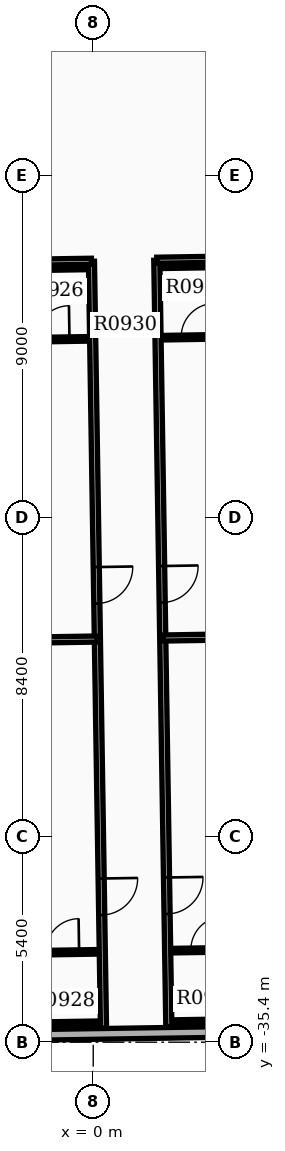
"""IFC4 building model, lengths in metres.
Left out: names, types, materials, properties, quantities, classifications, styles, units other than length and angle.
Written with IfcOpenShell. Run it as: python <this file> out.ifc"""

import sys

from ifc_helpers import new_model, si_unit, direction, frame, frame_2d, origin, place, context, subcontext, project, spatial, rectangle, extrude, element, fill, save


model = new_model("IFC4")
c1 = context("Model", 3, precision=1e-05, world=origin(), true_north=direction((0.0, 1.0)))
c2 = subcontext(c1, "Body", "Model", "MODEL_VIEW")
j1 = project(units=[si_unit("LENGTHUNIT", "METRE"), si_unit("PLANEANGLEUNIT", "RADIAN")], contexts=[c1])
p1 = place(None, origin())
s1 = spatial("IfcSite", under=j1, at=p1, CompositionType="ELEMENT")
p2 = place(p1, origin())
s2 = spatial("IfcBuilding", under=s1, at=p2, CompositionType="ELEMENT")
p3 = place(p2, frame((0.0, 0.0, 60.0)))
s3 = spatial("IfcBuildingStorey", under=s2, at=p3, CompositionType="ELEMENT", Elevation=60.0)
p4 = place(p3, frame((-6.307, -35.283, 0.0), z_axis=(0.0, 0.0, 1.0), x_axis=(0.999876549481, 0.015712599986, 0.0)))
e1 = element("IfcWall", 1, at=p4, inside=s3, PredefinedType="STANDARD", context=c2, shape_type="SweptSolid", body=[
    extrude(rectangle(XDim=13.72, YDim=0.28, at=frame_2d((6.86, 0.0))), origin(), (0.0, 0.0, 1.0), 2.91),
])
p5 = place(p4, frame((0.85, 0.0, 0.85)))
e2 = element("IfcOpeningElement", 2, at=p5, cuts=e1, PredefinedType="OPENING", context=c2, shape_type="SweptSolid", body=[
    extrude(rectangle(XDim=1.0, YDim=1.5, at=frame_2d((0.5, 0.75))), frame((0.0, 0.15, 0.0), z_axis=(0.0, -1.0, 0.0), x_axis=(1.0, 0.0, 0.0)), (0.0, 0.0, 1.0), 0.3),
])
p6 = place(p3, frame((1.673, -14.825, 0.0), z_axis=(0.0, 0.0, 1.0), x_axis=(0.015701893165, -0.999876717676, 0.0)))
e3 = element("IfcWall", 3, at=p6, inside=s3, PredefinedType="PARTITIONING", context=c2, shape_type="SweptSolid", body=[
    extrude(rectangle(XDim=20.182, YDim=0.16, at=frame_2d((10.091, 0.0))), origin(), (0.0, 0.0, 1.0), 2.9),
])
p7 = place(p6, frame((8.047, 0.0, 0.0)))
e4 = element("IfcOpeningElement", 4, at=p7, cuts=e3, PredefinedType="OPENING", context=c2, shape_type="SweptSolid", body=[
    extrude(rectangle(XDim=0.96, YDim=2.15, at=frame_2d((0.48, 1.075))), frame((0.0, 0.09, 0.0), z_axis=(0.0, -1.0, 0.0), x_axis=(1.0, 0.0, 0.0)), (0.0, 0.0, 1.0), 0.18),
])
p8 = place(p6, frame((16.243, 0.0, 0.0)))
e5 = element("IfcOpeningElement", 5, at=p8, cuts=e3, PredefinedType="OPENING", context=c2, shape_type="SweptSolid", body=[
    extrude(rectangle(XDim=0.96, YDim=2.15, at=frame_2d((0.48, 1.075))), frame((0.0, 0.09, 0.0), z_axis=(0.0, -1.0, 0.0), x_axis=(1.0, 0.0, 0.0)), (0.0, 0.0, 1.0), 0.18),
])
p9 = place(p3, frame((1.673, -14.825, 0.0), z_axis=(0.0, 0.0, 1.0), x_axis=(0.999877138082, 0.015675099418, 0.0)))
e6 = element("IfcWall", 6, at=p9, inside=s3, PredefinedType="PARTITIONING", context=c2, shape_type="SweptSolid", body=[
    extrude(rectangle(XDim=5.28, YDim=0.16, at=frame_2d((2.64, 0.0))), origin(), (0.0, 0.0, 1.0), 2.9),
])
p10 = place(p3, frame((1.829, -24.765, 0.0), z_axis=(0.0, 0.0, 1.0), x_axis=(0.99987677651, 0.01569814626, 0.0)))
e7 = element("IfcWall", 7, at=p10, inside=s3, PredefinedType="PARTITIONING", context=c2, shape_type="SweptSolid", body=[
    extrude(rectangle(XDim=5.132, YDim=0.16, at=frame_2d((2.566, 0.0))), origin(), (0.0, 0.0, 1.0), 2.9),
])
p11 = place(p3, frame((1.845, -16.863, 0.0), z_axis=(0.0, 0.0, 1.0), x_axis=(0.999876803258, 0.015696442504, 0.0)))
e8 = element("IfcWall", 8, at=p11, inside=s3, PredefinedType="PARTITIONING", context=c2, shape_type="SweptSolid", body=[
    extrude(rectangle(XDim=1.82, YDim=0.12, at=frame_2d((0.91, 0.0))), origin(), (0.0, 0.0, 1.0), 2.9),
])
p12 = place(p11, frame((0.47, 0.0, 0.0)))
e9 = element("IfcOpeningElement", 9, at=p12, cuts=e8, PredefinedType="OPENING", context=c2, shape_type="SweptSolid", body=[
    extrude(rectangle(XDim=0.88, YDim=2.1, at=frame_2d((0.44, 1.05))), frame((0.0, 0.07, 0.0), z_axis=(0.0, -1.0, 0.0), x_axis=(1.0, 0.0, 0.0)), (0.0, 0.0, 1.0), 0.14),
])
p13 = place(p3, frame((1.816, -14.983, 0.0), z_axis=(0.0, 0.0, 1.0), x_axis=(0.999874688728, 0.015830566654, 0.0)))
e10 = element("IfcWall", 10, at=p13, inside=s3, PredefinedType="PARTITIONING", context=c2, shape_type="SweptSolid", body=[
    extrude(rectangle(XDim=1.82, YDim=0.12, at=frame_2d((0.91, 0.0))), origin(), (0.0, 0.0, 1.0), 2.9),
])
p14 = place(p3, frame((2.098, -32.991, 0.0), z_axis=(0.0, 0.0, 1.0), x_axis=(0.999874722342, 0.015828443418, 0.0)))
e11 = element("IfcWall", 11, at=p14, inside=s3, PredefinedType="PARTITIONING", context=c2, shape_type="SweptSolid", body=[
    extrude(rectangle(XDim=1.82, YDim=0.12, at=frame_2d((0.91, 0.0))), origin(), (0.0, 0.0, 1.0), 2.9),
])
p15 = place(p14, frame((0.47, 0.0, 0.0)))
e12 = element("IfcOpeningElement", 12, at=p15, cuts=e11, PredefinedType="OPENING", context=c2, shape_type="SweptSolid", body=[
    extrude(rectangle(XDim=0.88, YDim=2.1, at=frame_2d((0.44, 1.05))), frame((0.0, 0.07, 0.0), z_axis=(0.0, -1.0, 0.0), x_axis=(1.0, 0.0, 0.0)), (0.0, 0.0, 1.0), 0.14),
])
p16 = place(p3, frame((2.128, -34.871, 0.0), z_axis=(0.0, 0.0, 1.0), x_axis=(0.999876836305, 0.015694337248, 0.0)))
e13 = element("IfcWall", 13, at=p16, inside=s3, PredefinedType="PARTITIONING", context=c2, shape_type="SweptSolid", body=[
    extrude(rectangle(XDim=1.82, YDim=0.12, at=frame_2d((0.91, 0.0))), origin(), (0.0, 0.0, 1.0), 2.9),
])
p17 = place(p3, frame((-0.047, -14.853, 0.0), z_axis=(0.0, 0.0, 1.0), x_axis=(0.015701893165, -0.999876717676, 0.0)))
e14 = element("IfcWall", 14, at=p17, inside=s3, PredefinedType="PARTITIONING", context=c2, shape_type="SweptSolid", body=[
    extrude(rectangle(XDim=20.182, YDim=0.16, at=frame_2d((10.091, 0.0))), origin(), (0.0, 0.0, 1.0), 2.9),
])
p18 = place(p17, frame((8.047, 0.0, 0.0)))
e15 = element("IfcOpeningElement", 15, at=p18, cuts=e14, PredefinedType="OPENING", context=c2, shape_type="SweptSolid", body=[
    extrude(rectangle(XDim=0.96, YDim=2.15, at=frame_2d((0.48, 1.075))), frame((0.0, 0.09, 0.0), z_axis=(0.0, -1.0, 0.0), x_axis=(1.0, 0.0, 0.0)), (0.0, 0.0, 1.0), 0.18),
])
p19 = place(p17, frame((16.243, 0.0, 0.0)))
e16 = element("IfcOpeningElement", 16, at=p19, cuts=e14, PredefinedType="OPENING", context=c2, shape_type="SweptSolid", body=[
    extrude(rectangle(XDim=0.96, YDim=2.15, at=frame_2d((0.48, 1.075))), frame((0.0, 0.09, 0.0), z_axis=(0.0, -1.0, 0.0), x_axis=(1.0, 0.0, 0.0)), (0.0, 0.0, 1.0), 0.18),
])
p20 = place(p3, frame((-0.047, -14.853, 0.0), z_axis=(0.0, 0.0, 1.0), x_axis=(-0.99987682984, -0.015694749102, 0.0)))
e17 = element("IfcWall", 17, at=p20, inside=s3, PredefinedType="PARTITIONING", context=c2, shape_type="SweptSolid", body=[
    extrude(rectangle(XDim=6.44, YDim=0.16, at=frame_2d((3.22, 0.0))), origin(), (0.0, 0.0, 1.0), 2.9),
])
p21 = place(p3, frame((0.109, -24.792, 0.0), z_axis=(0.0, 0.0, 1.0), x_axis=(-0.999876517768, -0.01571461794, 0.0)))
e18 = element("IfcWall", 18, at=p21, inside=s3, PredefinedType="PARTITIONING", context=c2, shape_type="SweptSolid", body=[
    extrude(rectangle(XDim=6.292, YDim=0.16, at=frame_2d((3.146, 0.0))), origin(), (0.0, 0.0, 1.0), 2.9),
])
p22 = place(p3, frame((-1.974, -16.923, 0.0), z_axis=(0.0, 0.0, 1.0), x_axis=(0.999876803258, 0.015696442504, 0.0)))
e19 = element("IfcWall", 19, at=p22, inside=s3, PredefinedType="PARTITIONING", context=c2, shape_type="SweptSolid", body=[
    extrude(rectangle(XDim=1.82, YDim=0.12, at=frame_2d((0.91, 0.0))), origin(), (0.0, 0.0, 1.0), 2.9),
])
p23 = place(p22, frame((0.47, 0.0, 0.0)))
e20 = element("IfcOpeningElement", 20, at=p23, cuts=e19, PredefinedType="OPENING", context=c2, shape_type="SweptSolid", body=[
    extrude(rectangle(XDim=0.88, YDim=2.1, at=frame_2d((0.44, 1.05))), frame((0.0, 0.07, 0.0), z_axis=(0.0, -1.0, 0.0), x_axis=(1.0, 0.0, 0.0)), (0.0, 0.0, 1.0), 0.14),
])
p24 = place(p3, frame((-2.004, -15.043, 0.0), z_axis=(0.0, 0.0, 1.0), x_axis=(0.999876836305, 0.015694337248, 0.0)))
e21 = element("IfcWall", 21, at=p24, inside=s3, PredefinedType="PARTITIONING", context=c2, shape_type="SweptSolid", body=[
    extrude(rectangle(XDim=1.82, YDim=0.12, at=frame_2d((0.91, 0.0))), origin(), (0.0, 0.0, 1.0), 2.9),
])
p25 = place(p3, frame((-1.721, -33.051, 0.0), z_axis=(0.0, 0.0, 1.0), x_axis=(0.999876836305, 0.015694337248, 0.0)))
e22 = element("IfcWall", 22, at=p25, inside=s3, PredefinedType="PARTITIONING", context=c2, shape_type="SweptSolid", body=[
    extrude(rectangle(XDim=1.82, YDim=0.12, at=frame_2d((0.91, 0.0))), origin(), (0.0, 0.0, 1.0), 2.9),
])
p26 = place(p25, frame((0.47, 0.0, 0.0)))
e23 = element("IfcOpeningElement", 23, at=p26, cuts=e22, PredefinedType="OPENING", context=c2, shape_type="SweptSolid", body=[
    extrude(rectangle(XDim=0.88, YDim=2.1, at=frame_2d((0.44, 1.05))), frame((0.0, 0.07, 0.0), z_axis=(0.0, -1.0, 0.0), x_axis=(1.0, 0.0, 0.0)), (0.0, 0.0, 1.0), 0.14),
])
p27 = place(p3, frame((-1.691, -34.931, 0.0), z_axis=(0.0, 0.0, 1.0), x_axis=(0.999876803258, 0.015696442504, 0.0)))
e24 = element("IfcWall", 24, at=p27, inside=s3, PredefinedType="PARTITIONING", context=c2, shape_type="SweptSolid", body=[
    extrude(rectangle(XDim=1.82, YDim=0.12, at=frame_2d((0.91, 0.0))), origin(), (0.0, 0.0, 1.0), 2.9),
])
p28 = place(p7, origin())
e25 = element("IfcDoor", 25, at=p28, inside=s3, OperationType="SINGLE_SWING_LEFT", PredefinedType="DOOR", context=c2, shape_type="SweptSolid", body=[
    extrude(rectangle(XDim=0.96, YDim=2.15, at=frame_2d((0.48, 1.075))), frame((0.0, 0.025, 0.0), z_axis=(0.0, -1.0, 0.0), x_axis=(1.0, 0.0, 0.0)), (0.0, 0.0, 1.0), 0.05),
])
fill(e4, e25)
p29 = place(p12, origin())
e26 = element("IfcDoor", 26, at=p29, inside=s3, OperationType="SINGLE_SWING_RIGHT", PredefinedType="DOOR", context=c2, shape_type="SweptSolid", body=[
    extrude(rectangle(XDim=0.88, YDim=2.1, at=frame_2d((0.44, 1.05))), frame((0.0, 0.025, 0.0), z_axis=(0.0, -1.0, 0.0), x_axis=(1.0, 0.0, 0.0)), (0.0, 0.0, 1.0), 0.05),
])
fill(e9, e26)
p30 = place(p8, origin())
e27 = element("IfcDoor", 27, at=p30, inside=s3, OperationType="SINGLE_SWING_LEFT", PredefinedType="DOOR", context=c2, shape_type="SweptSolid", body=[
    extrude(rectangle(XDim=0.96, YDim=2.15, at=frame_2d((0.48, 1.075))), frame((0.0, 0.025, 0.0), z_axis=(0.0, -1.0, 0.0), x_axis=(1.0, 0.0, 0.0)), (0.0, 0.0, 1.0), 0.05),
])
fill(e5, e27)
p31 = place(p15, origin())
e28 = element("IfcDoor", 28, at=p31, inside=s3, OperationType="SINGLE_SWING_RIGHT", PredefinedType="DOOR", context=c2, shape_type="SweptSolid", body=[
    extrude(rectangle(XDim=0.88, YDim=2.1, at=frame_2d((0.44, 1.05))), frame((0.0, 0.025, 0.0), z_axis=(0.0, -1.0, 0.0), x_axis=(1.0, 0.0, 0.0)), (0.0, 0.0, 1.0), 0.05),
])
fill(e12, e28)
p32 = place(p18, origin())
e29 = element("IfcDoor", 29, at=p32, inside=s3, OperationType="SINGLE_SWING_LEFT", PredefinedType="DOOR", context=c2, shape_type="SweptSolid", body=[
    extrude(rectangle(XDim=0.96, YDim=2.15, at=frame_2d((0.48, 1.075))), frame((0.0, 0.025, 0.0), z_axis=(0.0, -1.0, 0.0), x_axis=(1.0, 0.0, 0.0)), (0.0, 0.0, 1.0), 0.05),
])
fill(e15, e29)
p33 = place(p23, origin())
e30 = element("IfcDoor", 30, at=p33, inside=s3, OperationType="SINGLE_SWING_RIGHT", PredefinedType="DOOR", context=c2, shape_type="SweptSolid", body=[
    extrude(rectangle(XDim=0.88, YDim=2.1, at=frame_2d((0.44, 1.05))), frame((0.0, 0.025, 0.0), z_axis=(0.0, -1.0, 0.0), x_axis=(1.0, 0.0, 0.0)), (0.0, 0.0, 1.0), 0.05),
])
fill(e20, e30)
p34 = place(p19, origin())
e31 = element("IfcDoor", 31, at=p34, inside=s3, OperationType="SINGLE_SWING_LEFT", PredefinedType="DOOR", context=c2, shape_type="SweptSolid", body=[
    extrude(rectangle(XDim=0.96, YDim=2.15, at=frame_2d((0.48, 1.075))), frame((0.0, 0.025, 0.0), z_axis=(0.0, -1.0, 0.0), x_axis=(1.0, 0.0, 0.0)), (0.0, 0.0, 1.0), 0.05),
])
fill(e16, e31)
p35 = place(p26, origin())
e32 = element("IfcDoor", 32, at=p35, inside=s3, OperationType="SINGLE_SWING_RIGHT", PredefinedType="DOOR", context=c2, shape_type="SweptSolid", body=[
    extrude(rectangle(XDim=0.88, YDim=2.1, at=frame_2d((0.44, 1.05))), frame((0.0, 0.025, 0.0), z_axis=(0.0, -1.0, 0.0), x_axis=(1.0, 0.0, 0.0)), (0.0, 0.0, 1.0), 0.05),
])
fill(e23, e32)
save(model, sys.argv[1])
